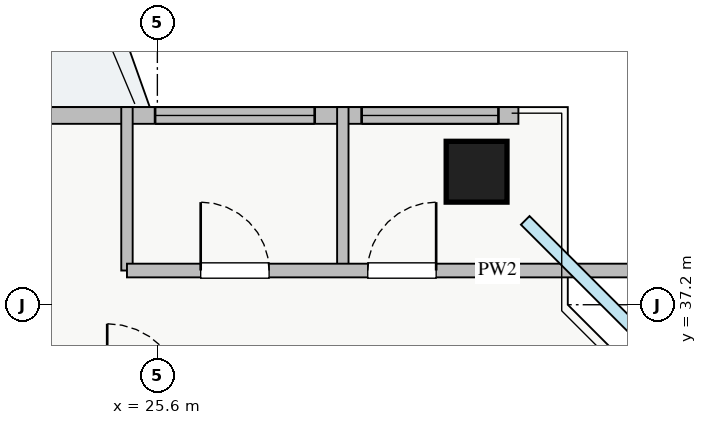
"""IFC4 building model, lengths in metres.
Left out: names, types, materials, properties, quantities, classifications, styles, units other than length and angle.
Written with IfcOpenShell. Run it as: python <this file> out.ifc"""

import sys

from ifc_helpers import new_model, si_unit, direction, frame, frame_2d, origin, origin_2d, place, context, subcontext, project, spatial, rectangle, extrude, source, transform, mapped, element, fill, save


model = new_model("IFC4")
c1 = context("Model", 3, precision=1e-05, world=origin(), true_north=direction((0.0, 1.0)))
c2 = subcontext(c1, "Body", "Model", "MODEL_VIEW")
j1 = project(units=[si_unit("LENGTHUNIT", "METRE"), si_unit("PLANEANGLEUNIT", "RADIAN")], contexts=[c1])
p1 = place(None, origin())
s1 = spatial("IfcSite", under=j1, at=p1, CompositionType="ELEMENT")
p2 = place(p1, origin())
s2 = spatial("IfcBuilding", under=s1, at=p2, CompositionType="ELEMENT")
p3 = place(p2, frame((0.0, 0.0, 213.25)))
s3 = spatial("IfcBuildingStorey", under=s2, at=p3, CompositionType="ELEMENT", Elevation=213.25)
m1 = source(origin(), c2, "Body", "SweptSolid", [
    extrude(rectangle(XDim=0.8, YDim=0.8, at=origin_2d()), origin(), (0.0, 0.0, 1.0), 3.25),
])
p4 = place(p3, frame((29.8, 38.95, 0.0), z_axis=(0.0, 0.0, 1.0), x_axis=(1.0, 0.0, 0.0)))
e1 = element("IfcColumn", 1, at=p4, inside=s3, PredefinedType="COLUMN", context=c2, shape_type="MappedRepresentation", body=[
    mapped(m1, transform((0.0, 0.0, 0.0), x_axis=(1.0, 0.0, 0.0), y_axis=(0.0, 1.0, 0.0), z_axis=(0.0, 0.0, 1.0), scale=1.0)),
])
p5 = place(p3, frame((7.65, 39.69, 0.0), z_axis=(0.0, 0.0, 1.0), x_axis=(1.0, 0.0, 0.0)))
e2 = element("IfcWall", 2, at=p5, inside=s3, PredefinedType="STANDARD", context=c2, shape_type="SweptSolid", body=[
    extrude(rectangle(XDim=22.7, YDim=0.22, at=frame_2d((11.35, 0.0))), origin(), (0.0, 0.0, 1.0), 2.61),
])
p6 = place(p5, frame((12.2, 0.0, 0.0)))
e3 = element("IfcOpeningElement", 3, at=p6, cuts=e2, PredefinedType="OPENING", context=c2, shape_type="SweptSolid", body=[
    extrude(rectangle(XDim=1.2, YDim=2.1, at=frame_2d((0.6, 1.05))), frame((0.0, 0.12, 0.0), z_axis=(0.0, -1.0, 0.0), x_axis=(1.0, 0.0, 0.0)), (0.0, 0.0, 1.0), 0.24),
])
p7 = place(p5, frame((1.637, 0.0, 0.9)))
e4 = element("IfcOpeningElement", 4, at=p7, cuts=e2, PredefinedType="OPENING", context=c2, shape_type="SweptSolid", body=[
    extrude(rectangle(XDim=2.4, YDim=1.48, at=frame_2d((1.2, 0.74))), frame((0.0, 0.12, 0.0), z_axis=(0.0, -1.0, 0.0), x_axis=(1.0, 0.0, 0.0)), (0.0, 0.0, 1.0), 0.24),
])
p8 = place(p5, frame((7.612, 0.0, 0.9)))
e5 = element("IfcOpeningElement", 5, at=p8, cuts=e2, PredefinedType="OPENING", context=c2, shape_type="SweptSolid", body=[
    extrude(rectangle(XDim=1.8, YDim=1.45, at=frame_2d((0.9, 0.725))), frame((0.0, 0.12, 0.0), z_axis=(0.0, -1.0, 0.0), x_axis=(1.0, 0.0, 0.0)), (0.0, 0.0, 1.0), 0.24),
])
p9 = place(p5, frame((17.92, 0.0, 0.9)))
e6 = element("IfcOpeningElement", 6, at=p9, cuts=e2, PredefinedType="OPENING", context=c2, shape_type="SweptSolid", body=[
    extrude(rectangle(XDim=2.1, YDim=1.5, at=frame_2d((1.05, 0.75))), frame((0.0, 0.12, 0.0), z_axis=(0.0, -1.0, 0.0), x_axis=(1.0, 0.0, 0.0)), (0.0, 0.0, 1.0), 0.24),
])
p10 = place(p5, frame((20.637, 0.0, 0.9)))
e7 = element("IfcOpeningElement", 7, at=p10, cuts=e2, PredefinedType="OPENING", context=c2, shape_type="SweptSolid", body=[
    extrude(rectangle(XDim=1.8, YDim=1.5, at=frame_2d((0.9, 0.75))), frame((0.0, 0.12, 0.0), z_axis=(0.0, -1.0, 0.0), x_axis=(1.0, 0.0, 0.0)), (0.0, 0.0, 1.0), 0.24),
])
for number, where, z_axis, x_axis in (
    (8, (25.2, 37.65, 0.0), (0.0, 0.0, 1.0), (0.0, 1.0, 0.0)),
    (9, (28.04, 37.65, 0.0), (0.0, 0.0, 1.0), (0.0, 1.0, 0.0)),
):
    element("IfcWall", number, at=place(p3, frame(where, z_axis=z_axis, x_axis=x_axis)), inside=s3, PredefinedType="PARTITIONING", context=c2, shape_type="SweptSolid", body=[
        extrude(rectangle(XDim=2.15, YDim=0.15, at=frame_2d((1.075, 0.0))), origin(), (0.0, 0.0, 1.0), 3.07),
    ])
p11 = place(p3, frame((25.2, 37.65, 0.0), z_axis=(0.0, 0.0, 1.0), x_axis=(1.0, 0.0, 0.0)))
e10 = element("IfcWall", 10, at=p11, inside=s3, PredefinedType="PARTITIONING", context=c2, shape_type="SweptSolid", body=[
    extrude(rectangle(XDim=7.25, YDim=0.18, at=frame_2d((3.625, 0.0))), origin(), (0.0, 0.0, 1.0), 3.07),
])
p12 = place(p11, frame((0.97, 0.0, 0.0)))
e11 = element("IfcOpeningElement", 11, at=p12, cuts=e10, PredefinedType="OPENING", context=c2, shape_type="SweptSolid", body=[
    extrude(rectangle(XDim=0.9, YDim=2.05, at=frame_2d((0.45, 1.025))), frame((0.0, 0.1, 0.0), z_axis=(0.0, -1.0, 0.0), x_axis=(1.0, 0.0, 0.0)), (0.0, 0.0, 1.0), 0.2),
])
p13 = place(p11, frame((3.168, 0.0, 0.0)))
e12 = element("IfcOpeningElement", 12, at=p13, cuts=e10, PredefinedType="OPENING", context=c2, shape_type="SweptSolid", body=[
    extrude(rectangle(XDim=0.9, YDim=2.05, at=frame_2d((0.45, 1.025))), frame((0.0, 0.1, 0.0), z_axis=(0.0, -1.0, 0.0), x_axis=(1.0, 0.0, 0.0)), (0.0, 0.0, 1.0), 0.2),
])
m2 = source(origin(), c2, "Body", "SweptSolid", [
    extrude(rectangle(XDim=2.1, YDim=1.5, at=frame_2d((1.05, 0.75))), frame((0.0, 0.03, 0.0), z_axis=(0.0, -1.0, 0.0), x_axis=(1.0, 0.0, 0.0)), (0.0, 0.0, 1.0), 0.06),
])
p14 = place(p9, origin())
e13 = element("IfcWindow", 13, at=p14, inside=s3, PartitioningType="TRIPLE_PANEL_VERTICAL", PredefinedType="WINDOW", context=c2, shape_type="MappedRepresentation", body=[
    mapped(m2, transform((0.0, 0.0, 0.0), x_axis=(1.0, 0.0, 0.0), y_axis=(0.0, 1.0, 0.0), z_axis=(0.0, 0.0, 1.0), scale=1.0)),
])
fill(e6, e13)
m3 = source(origin(), c2, "Body", "SweptSolid", [
    extrude(rectangle(XDim=0.9, YDim=2.05, at=frame_2d((0.45, 1.025))), frame((0.0, 0.025, 0.0), z_axis=(0.0, -1.0, 0.0), x_axis=(1.0, 0.0, 0.0)), (0.0, 0.0, 1.0), 0.05),
])
p15 = place(p12, origin())
e14 = element("IfcDoor", 14, at=p15, inside=s3, OperationType="SINGLE_SWING_LEFT", PredefinedType="DOOR", context=c2, shape_type="MappedRepresentation", body=[
    mapped(m3, transform((0.0, 0.0, 0.0), x_axis=(1.0, 0.0, 0.0), y_axis=(0.0, 1.0, 0.0), z_axis=(0.0, 0.0, 1.0), scale=1.0)),
])
fill(e11, e14)
p16 = place(p13, origin())
e15 = element("IfcDoor", 15, at=p16, inside=s3, OperationType="SINGLE_SWING_RIGHT", PredefinedType="DOOR", context=c2, shape_type="MappedRepresentation", body=[
    mapped(m3, transform((0.0, 0.0, 0.0), x_axis=(1.0, 0.0, 0.0), y_axis=(0.0, 1.0, 0.0), z_axis=(0.0, 0.0, 1.0), scale=1.0)),
])
fill(e12, e15)
m4 = source(origin(), c2, "Body", "SweptSolid", [
    extrude(rectangle(XDim=1.8, YDim=1.5, at=frame_2d((0.9, 0.75))), frame((0.0, 0.03, 0.0), z_axis=(0.0, -1.0, 0.0), x_axis=(1.0, 0.0, 0.0)), (0.0, 0.0, 1.0), 0.06),
])
p17 = place(p10, origin())
e16 = element("IfcWindow", 16, at=p17, inside=s3, PartitioningType="DOUBLE_PANEL_VERTICAL", PredefinedType="WINDOW", context=c2, shape_type="MappedRepresentation", body=[
    mapped(m4, transform((0.0, 0.0, 0.0), x_axis=(1.0, 0.0, 0.0), y_axis=(0.0, 1.0, 0.0), z_axis=(0.0, 0.0, 1.0), scale=1.0)),
])
fill(e7, e16)
save(model, sys.argv[1])
